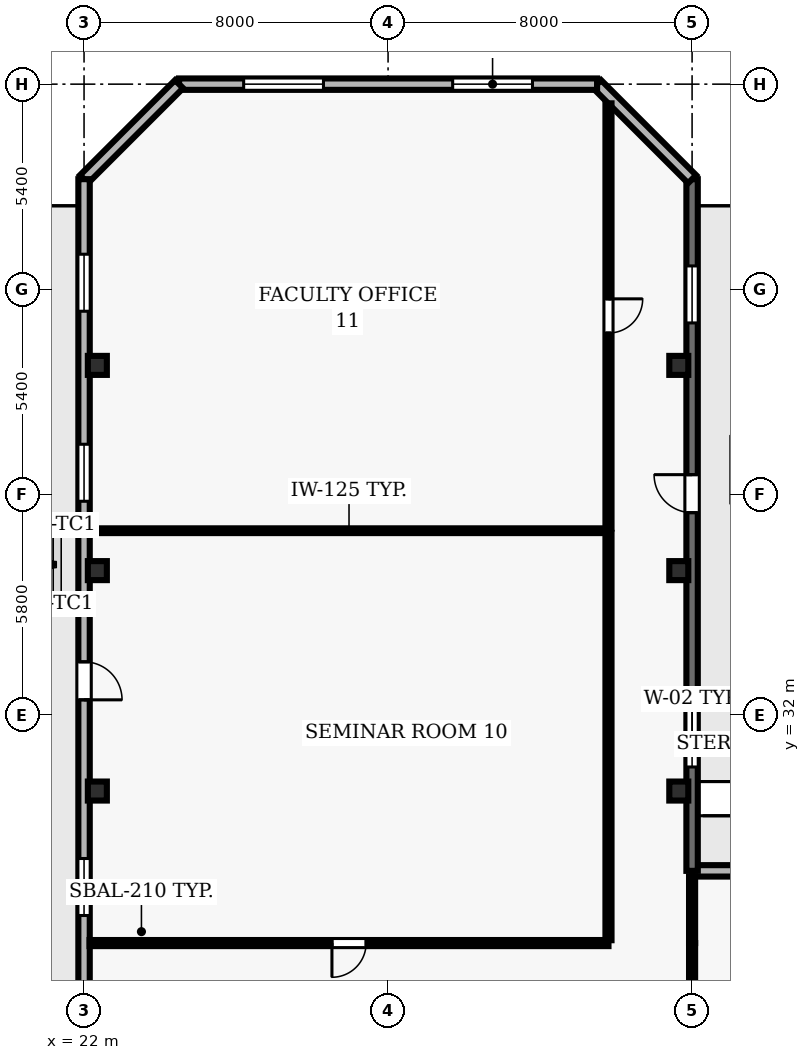
"""IFC4 building model, lengths in metres.
Left out: names, types, materials, properties, quantities, classifications, styles, units other than length and angle.
Written with IfcOpenShell. Run it as: python <this file> out.ifc"""

import sys

from ifc_helpers import new_model, si_unit, direction, frame, frame_2d, origin, origin_2d, place, context, subcontext, project, spatial, rectangle, hollow_rectangle, extrude, element, fill, save


model = new_model("IFC4")
c1 = context("Model", 3, precision=1e-05, world=origin(), true_north=direction((0.0, 1.0)))
c2 = subcontext(c1, "Body", "Model", "MODEL_VIEW")
j1 = project(units=[si_unit("LENGTHUNIT", "METRE"), si_unit("PLANEANGLEUNIT", "RADIAN")], contexts=[c1])
p1 = place(None, origin())
s1 = spatial("IfcSite", under=j1, at=p1, CompositionType="ELEMENT")
p2 = place(p1, origin())
s2 = spatial("IfcBuilding", under=s1, at=p2, CompositionType="ELEMENT")
p3 = place(p2, frame((0.0, 0.0, 122.9)))
s3 = spatial("IfcBuildingStorey", under=s2, at=p3, CompositionType="ELEMENT", Elevation=122.9)
for number, where, z_axis, x_axis in (
    (1, (22.35, 30.0, 0.0), (0.0, 0.0, 1.0), (1.0, 0.0, 0.0)),
    (2, (37.65, 30.0, 0.0), (0.0, 0.0, 1.0), (1.0, 0.0, 0.0)),
    (3, (22.35, 35.8, 0.0), (0.0, 0.0, 1.0), (1.0, 0.0, 0.0)),
    (4, (37.65, 35.8, 0.0), (0.0, 0.0, 1.0), (1.0, 0.0, 0.0)),
    (5, (22.35, 41.2, 0.0), (0.0, 0.0, 1.0), (1.0, 0.0, 0.0)),
    (6, (37.65, 41.2, 0.0), (0.0, 0.0, 1.0), (1.0, 0.0, 0.0)),
):
    element("IfcColumn", number, at=place(p3, frame(where, z_axis=z_axis, x_axis=x_axis)), inside=s3, PredefinedType="COLUMN", context=c2, shape_type="SweptSolid", body=[
        extrude(hollow_rectangle(XDim=0.5, YDim=0.5, WallThickness=0.025, at=origin_2d()), origin(), (0.0, 0.0, 1.0), 3.9),
    ])
p4 = place(p3, frame((46.151, 27.9, 0.0), z_axis=(0.0, 0.0, 1.0), x_axis=(-1.0, 0.0, 0.0)))
e7 = element("IfcWall", 7, at=p4, inside=s3, PredefinedType="SOLIDWALL", context=c2, shape_type="SweptSolid", body=[
    extrude(rectangle(XDim=8.151, YDim=0.3, at=frame_2d((4.075, 0.0))), origin(), (0.0, 0.0, 1.0), 3.69),
])
p5 = place(p4, frame((3.4, 0.0, 0.0)))
e8 = element("IfcOpeningElement", 8, at=p5, cuts=e7, PredefinedType="OPENING", context=c2, shape_type="SweptSolid", body=[
    extrude(rectangle(XDim=1.35, YDim=2.2, at=frame_2d((0.675, 1.1))), frame((0.0, 0.16, 0.0), z_axis=(0.0, -1.0, 0.0), x_axis=(1.0, 0.0, 0.0)), (0.0, 0.0, 1.0), 0.32),
])
p6 = place(p3, frame((38.0, 27.9, 0.0), z_axis=(0.0, 0.0, 1.0), x_axis=(0.0, 1.0, 0.0)))
e9 = element("IfcWall", 9, at=p6, inside=s3, PredefinedType="SOLIDWALL", context=c2, shape_type="SweptSolid", body=[
    extrude(rectangle(XDim=18.2, YDim=0.3, at=frame_2d((9.1, 0.0))), origin(), (0.0, 0.0, 1.0), 3.69),
])
p7 = place(p6, frame((9.425, 0.0, 0.0)))
e10 = element("IfcOpeningElement", 10, at=p7, cuts=e9, PredefinedType="OPENING", context=c2, shape_type="SweptSolid", body=[
    extrude(rectangle(XDim=1.0, YDim=2.2, at=frame_2d((0.5, 1.1))), frame((0.0, 0.16, 0.0), z_axis=(0.0, -1.0, 0.0), x_axis=(1.0, 0.0, 0.0)), (0.0, 0.0, 1.0), 0.32),
])
p8 = place(p6, frame((2.733, 0.0, 0.9)))
e11 = element("IfcOpeningElement", 11, at=p8, cuts=e9, PredefinedType="OPENING", context=c2, shape_type="SweptSolid", body=[
    extrude(rectangle(XDim=1.5, YDim=1.6, at=frame_2d((0.75, 0.8))), frame((0.0, 0.16, 0.0), z_axis=(0.0, -1.0, 0.0), x_axis=(1.0, 0.0, 0.0)), (0.0, 0.0, 1.0), 0.32),
])
p9 = place(p6, frame((14.417, 0.0, 0.9)))
e12 = element("IfcOpeningElement", 12, at=p9, cuts=e9, PredefinedType="OPENING", context=c2, shape_type="SweptSolid", body=[
    extrude(rectangle(XDim=1.5, YDim=1.6, at=frame_2d((0.75, 0.8))), frame((0.0, 0.16, 0.0), z_axis=(0.0, -1.0, 0.0), x_axis=(1.0, 0.0, 0.0)), (0.0, 0.0, 1.0), 0.32),
])
p10 = place(p3, frame((38.0, 46.1, 0.0), z_axis=(0.0, 0.0, 1.0), x_axis=(-0.707106781187, 0.707106781187, 0.0)))
e13 = element("IfcWall", 13, at=p10, inside=s3, PredefinedType="SOLIDWALL", context=c2, shape_type="SweptSolid", body=[
    extrude(rectangle(XDim=3.536, YDim=0.3, at=frame_2d((1.768, 0.0))), origin(), (0.0, 0.0, 1.0), 3.69),
])
p11 = place(p3, frame((35.5, 48.6, 0.0), z_axis=(0.0, 0.0, 1.0), x_axis=(-1.0, 0.0, 0.0)))
e14 = element("IfcWall", 14, at=p11, inside=s3, PredefinedType="SOLIDWALL", context=c2, shape_type="SweptSolid", body=[
    extrude(rectangle(XDim=11.0, YDim=0.3, at=frame_2d((5.5, 0.0))), origin(), (0.0, 0.0, 1.0), 3.69),
])
p12 = place(p11, frame((1.7, 0.0, 0.9)))
e15 = element("IfcOpeningElement", 15, at=p12, cuts=e14, PredefinedType="OPENING", context=c2, shape_type="SweptSolid", body=[
    extrude(rectangle(XDim=2.1, YDim=1.6, at=frame_2d((1.05, 0.8))), frame((0.0, 0.16, 0.0), z_axis=(0.0, -1.0, 0.0), x_axis=(1.0, 0.0, 0.0)), (0.0, 0.0, 1.0), 0.32),
])
p13 = place(p11, frame((7.2, 0.0, 0.9)))
e16 = element("IfcOpeningElement", 16, at=p13, cuts=e14, PredefinedType="OPENING", context=c2, shape_type="SweptSolid", body=[
    extrude(rectangle(XDim=2.1, YDim=1.6, at=frame_2d((1.05, 0.8))), frame((0.0, 0.16, 0.0), z_axis=(0.0, -1.0, 0.0), x_axis=(1.0, 0.0, 0.0)), (0.0, 0.0, 1.0), 0.32),
])
p14 = place(p3, frame((24.5, 48.6, 0.0), z_axis=(0.0, 0.0, 1.0), x_axis=(-0.707106781187, -0.707106781187, 0.0)))
e17 = element("IfcWall", 17, at=p14, inside=s3, PredefinedType="SOLIDWALL", context=c2, shape_type="SweptSolid", body=[
    extrude(rectangle(XDim=3.536, YDim=0.3, at=frame_2d((1.768, 0.0))), origin(), (0.0, 0.0, 1.0), 3.69),
])
p15 = place(p3, frame((22.0, 46.1, 0.0), z_axis=(0.0, 0.0, 1.0), x_axis=(0.0, -1.0, 0.0)))
e18 = element("IfcWall", 18, at=p15, inside=s3, PredefinedType="SOLIDWALL", context=c2, shape_type="SweptSolid", body=[
    extrude(rectangle(XDim=43.6, YDim=0.3, at=frame_2d((21.8, 0.0))), origin(), (0.0, 0.0, 1.0), 3.69),
])
p16 = place(p15, frame((12.7, 0.0, 0.0)))
e19 = element("IfcOpeningElement", 19, at=p16, cuts=e18, PredefinedType="OPENING", context=c2, shape_type="SweptSolid", body=[
    extrude(rectangle(XDim=1.0, YDim=2.2, at=frame_2d((0.5, 1.1))), frame((0.0, 0.16, 0.0), z_axis=(0.0, -1.0, 0.0), x_axis=(1.0, 0.0, 0.0)), (0.0, 0.0, 1.0), 0.32),
])
p17 = place(p15, frame((1.975, 0.0, 0.9)))
e20 = element("IfcOpeningElement", 20, at=p17, cuts=e18, PredefinedType="OPENING", context=c2, shape_type="SweptSolid", body=[
    extrude(rectangle(XDim=1.5, YDim=1.8, at=frame_2d((0.75, 0.9))), frame((0.0, 0.16, 0.0), z_axis=(0.0, -1.0, 0.0), x_axis=(1.0, 0.0, 0.0)), (0.0, 0.0, 1.0), 0.32),
])
p18 = place(p15, frame((6.975, 0.0, 0.9)))
e21 = element("IfcOpeningElement", 21, at=p18, cuts=e18, PredefinedType="OPENING", context=c2, shape_type="SweptSolid", body=[
    extrude(rectangle(XDim=1.5, YDim=1.8, at=frame_2d((0.75, 0.9))), frame((0.0, 0.16, 0.0), z_axis=(0.0, -1.0, 0.0), x_axis=(1.0, 0.0, 0.0)), (0.0, 0.0, 1.0), 0.32),
])
p19 = place(p15, frame((17.875, 0.0, 0.9)))
e22 = element("IfcOpeningElement", 22, at=p19, cuts=e18, PredefinedType="OPENING", context=c2, shape_type="SweptSolid", body=[
    extrude(rectangle(XDim=1.5, YDim=1.8, at=frame_2d((0.75, 0.9))), frame((0.0, 0.16, 0.0), z_axis=(0.0, -1.0, 0.0), x_axis=(1.0, 0.0, 0.0)), (0.0, 0.0, 1.0), 0.32),
])
p20 = place(p15, frame((23.775, 0.0, 0.9)))
e23 = element("IfcOpeningElement", 23, at=p20, cuts=e18, PredefinedType="OPENING", context=c2, shape_type="SweptSolid", body=[
    extrude(rectangle(XDim=1.5, YDim=1.8, at=frame_2d((0.75, 0.9))), frame((0.0, 0.16, 0.0), z_axis=(0.0, -1.0, 0.0), x_axis=(1.0, 0.0, 0.0)), (0.0, 0.0, 1.0), 0.32),
])
p21 = place(p15, frame((28.775, 0.0, 0.9)))
e24 = element("IfcOpeningElement", 24, at=p21, cuts=e18, PredefinedType="OPENING", context=c2, shape_type="SweptSolid", body=[
    extrude(rectangle(XDim=1.5, YDim=1.8, at=frame_2d((0.75, 0.9))), frame((0.0, 0.16, 0.0), z_axis=(0.0, -1.0, 0.0), x_axis=(1.0, 0.0, 0.0)), (0.0, 0.0, 1.0), 0.32),
])
p22 = place(p15, frame((34.675, 0.0, 0.9)))
e25 = element("IfcOpeningElement", 25, at=p22, cuts=e18, PredefinedType="OPENING", context=c2, shape_type="SweptSolid", body=[
    extrude(rectangle(XDim=1.5, YDim=1.8, at=frame_2d((0.75, 0.9))), frame((0.0, 0.16, 0.0), z_axis=(0.0, -1.0, 0.0), x_axis=(1.0, 0.0, 0.0)), (0.0, 0.0, 1.0), 0.32),
])
p23 = place(p3, frame((35.8, 26.0, 0.0), z_axis=(0.0, 0.0, 1.0), x_axis=(-1.0, 0.0, 0.0)))
e26 = element("IfcWall", 26, at=p23, inside=s3, PredefinedType="PARTITIONING", context=c2, shape_type="SweptSolid", body=[
    extrude(rectangle(XDim=13.655, YDim=0.16, at=frame_2d((6.828, 0.0))), origin(), (0.0, 0.0, 1.0), 3.69),
])
p24 = place(p23, frame((6.377, 0.0, 0.0)))
e27 = element("IfcOpeningElement", 27, at=p24, cuts=e26, PredefinedType="OPENING", context=c2, shape_type="SweptSolid", body=[
    extrude(rectangle(XDim=0.9, YDim=2.1, at=frame_2d((0.45, 1.05))), frame((0.0, 0.09, 0.0), z_axis=(0.0, -1.0, 0.0), x_axis=(1.0, 0.0, 0.0)), (0.0, 0.0, 1.0), 0.18),
])
p25 = place(p3, frame((35.8, 36.85, 0.0), z_axis=(0.0, 0.0, 1.0), x_axis=(-1.0, 0.0, 0.0)))
e28 = element("IfcWall", 28, at=p25, inside=s3, PredefinedType="PARTITIONING", context=c2, shape_type="SweptSolid", body=[
    extrude(rectangle(XDim=13.655, YDim=0.125, at=frame_2d((6.828, 0.0))), origin(), (0.0, 0.0, 1.0), 3.69),
])
p26 = place(p3, frame((35.8, 36.793, 0.0), z_axis=(0.0, 0.0, 1.0), x_axis=(0.0, -1.0, 0.0)))
e29 = element("IfcWall", 29, at=p26, inside=s3, PredefinedType="PARTITIONING", context=c2, shape_type="SweptSolid", body=[
    extrude(rectangle(XDim=10.718, YDim=0.16, at=frame_2d((5.359, 0.0))), origin(), (0.0, 0.0, 1.0), 3.69),
])
p27 = place(p3, frame((35.8, 48.095, 0.0), z_axis=(0.0, 0.0, 1.0), x_axis=(0.0, -1.0, 0.0)))
e30 = element("IfcWall", 30, at=p27, inside=s3, PredefinedType="PARTITIONING", context=c2, shape_type="SweptSolid", body=[
    extrude(rectangle(XDim=11.188, YDim=0.16, at=frame_2d((5.594, 0.0))), origin(), (0.0, 0.0, 1.0), 3.69),
])
p28 = place(p27, frame((5.144, 0.0, 0.0)))
e31 = element("IfcOpeningElement", 31, at=p28, cuts=e30, PredefinedType="OPENING", context=c2, shape_type="SweptSolid", body=[
    extrude(rectangle(XDim=0.9, YDim=2.1, at=frame_2d((0.45, 1.05))), frame((0.0, 0.09, 0.0), z_axis=(0.0, -1.0, 0.0), x_axis=(1.0, 0.0, 0.0)), (0.0, 0.0, 1.0), 0.18),
])
p29 = place(p3, frame((38.0, 23.85, 0.0), z_axis=(0.0, 0.0, 1.0), x_axis=(0.0, 1.0, 0.0)))
e32 = element("IfcWall", 32, at=p29, inside=s3, PredefinedType="PARTITIONING", context=c2, shape_type="SweptSolid", body=[
    extrude(rectangle(XDim=2.15, YDim=0.16, at=frame_2d((1.075, 0.0))), origin(), (0.0, 0.0, 1.0), 3.073),
])
p30 = place(p3, frame((38.0, 26.0, 0.0), z_axis=(0.0, 0.0, 1.0), x_axis=(0.0, 1.0, 0.0)))
e33 = element("IfcWall", 33, at=p30, inside=s3, PredefinedType="PARTITIONING", context=c2, shape_type="SweptSolid", body=[
    extrude(rectangle(XDim=1.755, YDim=0.16, at=frame_2d((0.877, 0.0))), origin(), (0.0, 0.0, 1.0), 3.073),
])
p31 = place(p7, origin())
e34 = element("IfcDoor", 34, at=p31, inside=s3, OperationType="SINGLE_SWING_RIGHT", PredefinedType="DOOR", context=c2, shape_type="SweptSolid", body=[
    extrude(rectangle(XDim=1.0, YDim=2.2, at=frame_2d((0.5, 1.1))), frame((0.0, 0.025, 0.0), z_axis=(0.0, -1.0, 0.0), x_axis=(1.0, 0.0, 0.0)), (0.0, 0.0, 1.0), 0.05),
])
fill(e10, e34)
p32 = place(p8, origin())
e35 = element("IfcWindow", 35, at=p32, inside=s3, PartitioningType="SINGLE_PANEL", PredefinedType="WINDOW", context=c2, shape_type="SweptSolid", body=[
    extrude(rectangle(XDim=1.5, YDim=1.6, at=frame_2d((0.75, 0.8))), frame((0.0, 0.03, 0.0), z_axis=(0.0, -1.0, 0.0), x_axis=(1.0, 0.0, 0.0)), (0.0, 0.0, 1.0), 0.06),
])
fill(e11, e35)
p33 = place(p9, origin())
e36 = element("IfcWindow", 36, at=p33, inside=s3, PartitioningType="SINGLE_PANEL", PredefinedType="WINDOW", context=c2, shape_type="SweptSolid", body=[
    extrude(rectangle(XDim=1.5, YDim=1.6, at=frame_2d((0.75, 0.8))), frame((0.0, 0.03, 0.0), z_axis=(0.0, -1.0, 0.0), x_axis=(1.0, 0.0, 0.0)), (0.0, 0.0, 1.0), 0.06),
])
fill(e12, e36)
p34 = place(p12, origin())
e37 = element("IfcWindow", 37, at=p34, inside=s3, PartitioningType="SINGLE_PANEL", PredefinedType="WINDOW", context=c2, shape_type="SweptSolid", body=[
    extrude(rectangle(XDim=2.1, YDim=1.6, at=frame_2d((1.05, 0.8))), frame((0.0, 0.03, 0.0), z_axis=(0.0, -1.0, 0.0), x_axis=(1.0, 0.0, 0.0)), (0.0, 0.0, 1.0), 0.06),
])
fill(e15, e37)
p35 = place(p13, origin())
e38 = element("IfcWindow", 38, at=p35, inside=s3, PartitioningType="SINGLE_PANEL", PredefinedType="WINDOW", context=c2, shape_type="SweptSolid", body=[
    extrude(rectangle(XDim=2.1, YDim=1.6, at=frame_2d((1.05, 0.8))), frame((0.0, 0.03, 0.0), z_axis=(0.0, -1.0, 0.0), x_axis=(1.0, 0.0, 0.0)), (0.0, 0.0, 1.0), 0.06),
])
fill(e16, e38)
p36 = place(p16, origin())
e39 = element("IfcDoor", 39, at=p36, inside=s3, OperationType="SINGLE_SWING_RIGHT", PredefinedType="DOOR", context=c2, shape_type="SweptSolid", body=[
    extrude(rectangle(XDim=1.0, YDim=2.2, at=frame_2d((0.5, 1.1))), frame((0.0, 0.025, 0.0), z_axis=(0.0, -1.0, 0.0), x_axis=(1.0, 0.0, 0.0)), (0.0, 0.0, 1.0), 0.05),
])
fill(e19, e39)
p37 = place(p17, origin())
e40 = element("IfcWindow", 40, at=p37, inside=s3, PartitioningType="SINGLE_PANEL", PredefinedType="WINDOW", context=c2, shape_type="SweptSolid", body=[
    extrude(rectangle(XDim=1.5, YDim=1.8, at=frame_2d((0.75, 0.9))), frame((0.0, 0.03, 0.0), z_axis=(0.0, -1.0, 0.0), x_axis=(1.0, 0.0, 0.0)), (0.0, 0.0, 1.0), 0.06),
])
fill(e20, e40)
p38 = place(p18, origin())
e41 = element("IfcWindow", 41, at=p38, inside=s3, PartitioningType="SINGLE_PANEL", PredefinedType="WINDOW", context=c2, shape_type="SweptSolid", body=[
    extrude(rectangle(XDim=1.5, YDim=1.8, at=frame_2d((0.75, 0.9))), frame((0.0, 0.03, 0.0), z_axis=(0.0, -1.0, 0.0), x_axis=(1.0, 0.0, 0.0)), (0.0, 0.0, 1.0), 0.06),
])
fill(e21, e41)
p39 = place(p19, origin())
e42 = element("IfcWindow", 42, at=p39, inside=s3, PartitioningType="SINGLE_PANEL", PredefinedType="WINDOW", context=c2, shape_type="SweptSolid", body=[
    extrude(rectangle(XDim=1.5, YDim=1.8, at=frame_2d((0.75, 0.9))), frame((0.0, 0.03, 0.0), z_axis=(0.0, -1.0, 0.0), x_axis=(1.0, 0.0, 0.0)), (0.0, 0.0, 1.0), 0.06),
])
fill(e22, e42)
p40 = place(p24, origin())
e43 = element("IfcDoor", 43, at=p40, inside=s3, OperationType="SINGLE_SWING_RIGHT", PredefinedType="DOOR", context=c2, shape_type="SweptSolid", body=[
    extrude(rectangle(XDim=0.9, YDim=2.1, at=frame_2d((0.45, 1.05))), frame((0.0, 0.025, 0.0), z_axis=(0.0, -1.0, 0.0), x_axis=(1.0, 0.0, 0.0)), (0.0, 0.0, 1.0), 0.05),
])
fill(e27, e43)
p41 = place(p28, origin())
e44 = element("IfcDoor", 44, at=p41, inside=s3, OperationType="SINGLE_SWING_LEFT", PredefinedType="DOOR", context=c2, shape_type="SweptSolid", body=[
    extrude(rectangle(XDim=0.9, YDim=2.1, at=frame_2d((0.45, 1.05))), frame((0.0, 0.025, 0.0), z_axis=(0.0, -1.0, 0.0), x_axis=(1.0, 0.0, 0.0)), (0.0, 0.0, 1.0), 0.05),
])
fill(e31, e44)
save(model, sys.argv[1])
